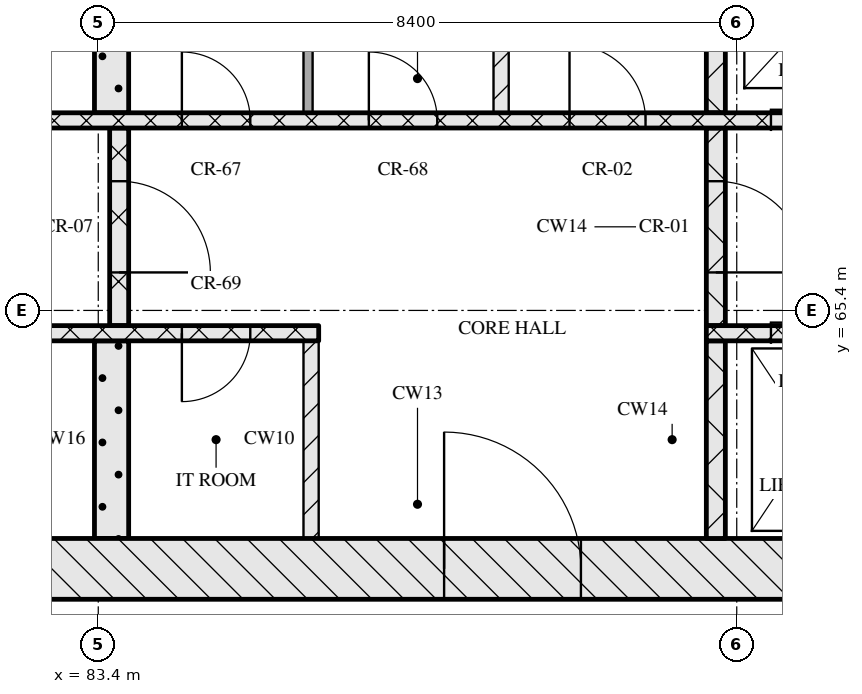
"""IFC4 building model, lengths in metres.
Left out: names, types, materials, properties, quantities, classifications, styles, units other than length and angle.
Written with IfcOpenShell. Run it as: python <this file> out.ifc"""

import sys

from ifc_helpers import new_model, si_unit, direction, frame, frame_2d, origin, place, context, subcontext, project, spatial, rectangle, extrude, element, fill, save


model = new_model("IFC4")
c1 = context("Model", 3, precision=1e-05, world=origin(), true_north=direction((0.0, 1.0)))
c2 = subcontext(c1, "Body", "Model", "MODEL_VIEW")
j1 = project(units=[si_unit("LENGTHUNIT", "METRE"), si_unit("PLANEANGLEUNIT", "RADIAN")], contexts=[c1])
p1 = place(None, origin())
s1 = spatial("IfcSite", under=j1, at=p1, CompositionType="ELEMENT")
p2 = place(p1, origin())
s2 = spatial("IfcBuilding", under=s1, at=p2, CompositionType="ELEMENT")
p3 = place(p2, frame((0.0, 0.0, 154.65)))
s3 = spatial("IfcBuildingStorey", under=s2, at=p3, CompositionType="ELEMENT", Elevation=154.65)
p4 = place(p3, frame((67.0, 62.0, 0.0), z_axis=(0.0, 0.0, 1.0), x_axis=(1.0, 0.0, 0.0)))
e1 = element("IfcWall", 1, at=p4, inside=s3, PredefinedType="SOLIDWALL", context=c2, shape_type="SweptSolid", body=[
    extrude(rectangle(XDim=41.2, YDim=0.8, at=frame_2d((20.6, 0.0))), origin(), (0.0, 0.0, 1.0), 3.32),
])
p5 = place(p4, frame((20.95, 0.0, 0.0)))
e2 = element("IfcOpeningElement", 2, at=p5, cuts=e1, PredefinedType="OPENING", context=c2, shape_type="SweptSolid", body=[
    extrude(rectangle(XDim=1.8, YDim=2.1, at=frame_2d((0.9, 1.05))), frame((0.0, 0.41, 0.0), z_axis=(0.0, -1.0, 0.0), x_axis=(1.0, 0.0, 0.0)), (0.0, 0.0, 1.0), 0.82),
])
p6 = place(p3, frame((83.575, 62.4, 0.0), z_axis=(0.0, 0.0, 1.0), x_axis=(0.0, 1.0, 0.0)))
e3 = element("IfcWall", 3, at=p6, inside=s3, PredefinedType="SOLIDWALL", context=c2, shape_type="SweptSolid", body=[
    extrude(rectangle(XDim=2.6, YDim=0.45, at=frame_2d((1.3, 0.0))), origin(), (0.0, 0.0, 1.0), 3.32),
])
p7 = place(p3, frame((86.2, 62.4, 0.0), z_axis=(0.0, 0.0, 1.0), x_axis=(0.0, 1.0, 0.0)))
e4 = element("IfcWall", 4, at=p7, inside=s3, PredefinedType="PARTITIONING", context=c2, shape_type="SweptSolid", body=[
    extrude(rectangle(XDim=2.6, YDim=0.2, at=frame_2d((1.3, 0.0))), origin(), (0.0, 0.0, 1.0), 3.32),
])
p8 = place(p3, frame((91.525, 62.4, 0.0), z_axis=(0.0, 0.0, 1.0), x_axis=(0.0, 1.0, 0.0)))
e5 = element("IfcWall", 5, at=p8, inside=s3, PredefinedType="SOLIDWALL", context=c2, shape_type="SweptSolid", body=[
    extrude(rectangle(XDim=2.6, YDim=0.25, at=frame_2d((1.3, 0.0))), origin(), (0.0, 0.0, 1.0), 3.32),
])
p9 = place(p3, frame((67.8, 65.1, 0.0), z_axis=(0.0, 0.0, 1.0), x_axis=(1.0, 0.0, 0.0)))
e6 = element("IfcWall", 6, at=p9, inside=s3, PredefinedType="SOLIDWALL", context=c2, shape_type="SweptSolid", body=[
    extrude(rectangle(XDim=18.5, YDim=0.2, at=frame_2d((9.25, 0.0))), origin(), (0.0, 0.0, 1.0), 3.32),
])
p10 = place(p9, frame((7.27, 0.0, 0.0)))
e7 = element("IfcOpeningElement", 7, at=p10, cuts=e6, PredefinedType="OPENING", context=c2, shape_type="SweptSolid", body=[
    extrude(rectangle(XDim=0.9, YDim=2.1, at=frame_2d((0.45, 1.05))), frame((0.0, 0.11, 0.0), z_axis=(0.0, -1.0, 0.0), x_axis=(1.0, 0.0, 0.0)), (0.0, 0.0, 1.0), 0.22),
])
p11 = place(p9, frame((11.45, 0.0, 0.0)))
e8 = element("IfcOpeningElement", 8, at=p11, cuts=e6, PredefinedType="OPENING", context=c2, shape_type="SweptSolid", body=[
    extrude(rectangle(XDim=0.9, YDim=2.1, at=frame_2d((0.45, 1.05))), frame((0.0, 0.11, 0.0), z_axis=(0.0, -1.0, 0.0), x_axis=(1.0, 0.0, 0.0)), (0.0, 0.0, 1.0), 0.22),
])
p12 = place(p9, frame((16.7, 0.0, 0.0)))
e9 = element("IfcOpeningElement", 9, at=p12, cuts=e6, PredefinedType="OPENING", context=c2, shape_type="SweptSolid", body=[
    extrude(rectangle(XDim=0.9, YDim=2.1, at=frame_2d((0.45, 1.05))), frame((0.0, 0.11, 0.0), z_axis=(0.0, -1.0, 0.0), x_axis=(1.0, 0.0, 0.0)), (0.0, 0.0, 1.0), 0.22),
])
p13 = place(p3, frame((91.4, 65.1, 0.0), z_axis=(0.0, 0.0, 1.0), x_axis=(1.0, 0.0, 0.0)))
e10 = element("IfcWall", 10, at=p13, inside=s3, PredefinedType="SOLIDWALL", context=c2, shape_type="SweptSolid", body=[
    extrude(rectangle(XDim=16.0, YDim=0.2, at=frame_2d((8.0, 0.0))), origin(), (0.0, 0.0, 1.0), 3.32),
])
p14 = place(p13, frame((0.85, 0.0, 0.0)))
e11 = element("IfcOpeningElement", 11, at=p14, cuts=e10, PredefinedType="OPENING", context=c2, shape_type="SweptSolid", body=[
    extrude(rectangle(XDim=1.1, YDim=2.1, at=frame_2d((0.55, 1.05))), frame((0.0, 0.11, 0.0), z_axis=(0.0, -1.0, 0.0), x_axis=(1.0, 0.0, 0.0)), (0.0, 0.0, 1.0), 0.22),
])
p15 = place(p13, frame((3.35, 0.0, 0.0)))
e12 = element("IfcOpeningElement", 12, at=p15, cuts=e10, PredefinedType="OPENING", context=c2, shape_type="SweptSolid", body=[
    extrude(rectangle(XDim=1.1, YDim=2.1, at=frame_2d((0.55, 1.05))), frame((0.0, 0.11, 0.0), z_axis=(0.0, -1.0, 0.0), x_axis=(1.0, 0.0, 0.0)), (0.0, 0.0, 1.0), 0.22),
])
p16 = place(p13, frame((5.85, 0.0, 0.0)))
e13 = element("IfcOpeningElement", 13, at=p16, cuts=e10, PredefinedType="OPENING", context=c2, shape_type="SweptSolid", body=[
    extrude(rectangle(XDim=1.1, YDim=2.1, at=frame_2d((0.55, 1.05))), frame((0.0, 0.11, 0.0), z_axis=(0.0, -1.0, 0.0), x_axis=(1.0, 0.0, 0.0)), (0.0, 0.0, 1.0), 0.22),
])
p17 = place(p13, frame((7.83, 0.0, 0.0)))
e14 = element("IfcOpeningElement", 14, at=p17, cuts=e10, PredefinedType="OPENING", context=c2, shape_type="SweptSolid", body=[
    extrude(rectangle(XDim=0.9, YDim=2.1, at=frame_2d((0.45, 1.05))), frame((0.0, 0.11, 0.0), z_axis=(0.0, -1.0, 0.0), x_axis=(1.0, 0.0, 0.0)), (0.0, 0.0, 1.0), 0.22),
])
p18 = place(p3, frame((83.675, 65.2, 0.0), z_axis=(0.0, 0.0, 1.0), x_axis=(0.0, 1.0, 0.0)))
e15 = element("IfcWall", 15, at=p18, inside=s3, PredefinedType="SOLIDWALL", context=c2, shape_type="SweptSolid", body=[
    extrude(rectangle(XDim=2.6, YDim=0.25, at=frame_2d((1.3, 0.0))), origin(), (0.0, 0.0, 1.0), 3.32),
])
p19 = place(p18, frame((0.7, 0.0, 0.0)))
e16 = element("IfcOpeningElement", 16, at=p19, cuts=e15, PredefinedType="OPENING", context=c2, shape_type="SweptSolid", body=[
    extrude(rectangle(XDim=1.2, YDim=2.1, at=frame_2d((0.6, 1.05))), frame((0.0, 0.135, 0.0), z_axis=(0.0, -1.0, 0.0), x_axis=(1.0, 0.0, 0.0)), (0.0, 0.0, 1.0), 0.27),
])
p20 = place(p3, frame((91.525, 65.2, 0.0), z_axis=(0.0, 0.0, 1.0), x_axis=(0.0, 1.0, 0.0)))
e17 = element("IfcWall", 17, at=p20, inside=s3, PredefinedType="SOLIDWALL", context=c2, shape_type="SweptSolid", body=[
    extrude(rectangle(XDim=2.6, YDim=0.25, at=frame_2d((1.3, 0.0))), origin(), (0.0, 0.0, 1.0), 3.32),
])
p21 = place(p20, frame((0.7, 0.0, 0.0)))
e18 = element("IfcOpeningElement", 18, at=p21, cuts=e17, PredefinedType="OPENING", context=c2, shape_type="SweptSolid", body=[
    extrude(rectangle(XDim=1.2, YDim=2.1, at=frame_2d((0.6, 1.05))), frame((0.0, 0.135, 0.0), z_axis=(0.0, -1.0, 0.0), x_axis=(1.0, 0.0, 0.0)), (0.0, 0.0, 1.0), 0.27),
])
p22 = place(p3, frame((76.05, 67.9, 0.0), z_axis=(0.0, 0.0, 1.0), x_axis=(1.0, 0.0, 0.0)))
e19 = element("IfcWall", 19, at=p22, inside=s3, PredefinedType="SOLIDWALL", context=c2, shape_type="SweptSolid", body=[
    extrude(rectangle(XDim=23.1, YDim=0.2, at=frame_2d((11.55, 0.0))), origin(), (0.0, 0.0, 1.0), 3.32),
])
p23 = place(p22, frame((1.4, 0.0, 0.0)))
e20 = element("IfcOpeningElement", 20, at=p23, cuts=e19, PredefinedType="OPENING", context=c2, shape_type="SweptSolid", body=[
    extrude(rectangle(XDim=0.9, YDim=2.1, at=frame_2d((0.45, 1.05))), frame((0.0, 0.11, 0.0), z_axis=(0.0, -1.0, 0.0), x_axis=(1.0, 0.0, 0.0)), (0.0, 0.0, 1.0), 0.22),
])
p24 = place(p22, frame((5.11, 0.0, 0.0)))
e21 = element("IfcOpeningElement", 21, at=p24, cuts=e19, PredefinedType="OPENING", context=c2, shape_type="SweptSolid", body=[
    extrude(rectangle(XDim=0.9, YDim=2.1, at=frame_2d((0.45, 1.05))), frame((0.0, 0.11, 0.0), z_axis=(0.0, -1.0, 0.0), x_axis=(1.0, 0.0, 0.0)), (0.0, 0.0, 1.0), 0.22),
])
p25 = place(p22, frame((8.45, 0.0, 0.0)))
e22 = element("IfcOpeningElement", 22, at=p25, cuts=e19, PredefinedType="OPENING", context=c2, shape_type="SweptSolid", body=[
    extrude(rectangle(XDim=0.9, YDim=2.1, at=frame_2d((0.45, 1.05))), frame((0.0, 0.11, 0.0), z_axis=(0.0, -1.0, 0.0), x_axis=(1.0, 0.0, 0.0)), (0.0, 0.0, 1.0), 0.22),
])
p26 = place(p22, frame((10.91, 0.0, 0.0)))
e23 = element("IfcOpeningElement", 23, at=p26, cuts=e19, PredefinedType="OPENING", context=c2, shape_type="SweptSolid", body=[
    extrude(rectangle(XDim=0.9, YDim=2.1, at=frame_2d((0.45, 1.05))), frame((0.0, 0.11, 0.0), z_axis=(0.0, -1.0, 0.0), x_axis=(1.0, 0.0, 0.0)), (0.0, 0.0, 1.0), 0.22),
])
p27 = place(p22, frame((13.55, 0.0, 0.0)))
e24 = element("IfcOpeningElement", 24, at=p27, cuts=e19, PredefinedType="OPENING", context=c2, shape_type="SweptSolid", body=[
    extrude(rectangle(XDim=1.0, YDim=2.1, at=frame_2d((0.5, 1.05))), frame((0.0, 0.11, 0.0), z_axis=(0.0, -1.0, 0.0), x_axis=(1.0, 0.0, 0.0)), (0.0, 0.0, 1.0), 0.22),
])
p28 = place(p22, frame((16.2, 0.0, 0.0)))
e25 = element("IfcOpeningElement", 25, at=p28, cuts=e19, PredefinedType="OPENING", context=c2, shape_type="SweptSolid", body=[
    extrude(rectangle(XDim=1.1, YDim=2.1, at=frame_2d((0.55, 1.05))), frame((0.0, 0.11, 0.0), z_axis=(0.0, -1.0, 0.0), x_axis=(1.0, 0.0, 0.0)), (0.0, 0.0, 1.0), 0.22),
])
p29 = place(p22, frame((18.7, 0.0, 0.0)))
e26 = element("IfcOpeningElement", 26, at=p29, cuts=e19, PredefinedType="OPENING", context=c2, shape_type="SweptSolid", body=[
    extrude(rectangle(XDim=1.1, YDim=2.1, at=frame_2d((0.55, 1.05))), frame((0.0, 0.11, 0.0), z_axis=(0.0, -1.0, 0.0), x_axis=(1.0, 0.0, 0.0)), (0.0, 0.0, 1.0), 0.22),
])
p30 = place(p22, frame((21.2, 0.0, 0.0)))
e27 = element("IfcOpeningElement", 27, at=p30, cuts=e19, PredefinedType="OPENING", context=c2, shape_type="SweptSolid", body=[
    extrude(rectangle(XDim=1.1, YDim=2.1, at=frame_2d((0.55, 1.05))), frame((0.0, 0.11, 0.0), z_axis=(0.0, -1.0, 0.0), x_axis=(1.0, 0.0, 0.0)), (0.0, 0.0, 1.0), 0.22),
])
p31 = place(p3, frame((83.575, 68.0, 0.0), z_axis=(0.0, 0.0, 1.0), x_axis=(0.0, 1.0, 0.0)))
e28 = element("IfcWall", 28, at=p31, inside=s3, PredefinedType="SOLIDWALL", context=c2, shape_type="SweptSolid", body=[
    extrude(rectangle(XDim=2.6, YDim=0.45, at=frame_2d((1.3, 0.0))), origin(), (0.0, 0.0, 1.0), 3.32),
])
p32 = place(p3, frame((86.16, 68.0, 0.0), z_axis=(0.0, 0.0, 1.0), x_axis=(0.0, 1.0, 0.0)))
e29 = element("IfcWall", 29, at=p32, inside=s3, PredefinedType="PARTITIONING", context=c2, shape_type="SweptSolid", body=[
    extrude(rectangle(XDim=2.6, YDim=0.12, at=frame_2d((1.3, 0.0))), origin(), (0.0, 0.0, 1.0), 3.32),
])
p33 = place(p3, frame((88.7, 68.0, 0.0), z_axis=(0.0, 0.0, 1.0), x_axis=(0.0, 1.0, 0.0)))
e30 = element("IfcWall", 30, at=p33, inside=s3, PredefinedType="PARTITIONING", context=c2, shape_type="SweptSolid", body=[
    extrude(rectangle(XDim=2.6, YDim=0.2, at=frame_2d((1.3, 0.0))), origin(), (0.0, 0.0, 1.0), 3.32),
])
p34 = place(p3, frame((91.525, 68.0, 0.0), z_axis=(0.0, 0.0, 1.0), x_axis=(0.0, 1.0, 0.0)))
e31 = element("IfcWall", 31, at=p34, inside=s3, PredefinedType="SOLIDWALL", context=c2, shape_type="SweptSolid", body=[
    extrude(rectangle(XDim=2.6, YDim=0.25, at=frame_2d((1.3, 0.0))), origin(), (0.0, 0.0, 1.0), 3.32),
])
p35 = place(p5, origin())
e32 = element("IfcDoor", 32, at=p35, inside=s3, OperationType="DOUBLE_DOOR_SINGLE_SWING", PredefinedType="DOOR", context=c2, shape_type="SweptSolid", body=[
    extrude(rectangle(XDim=1.8, YDim=2.1, at=frame_2d((0.9, 1.05))), frame((0.0, 0.025, 0.0), z_axis=(0.0, -1.0, 0.0), x_axis=(1.0, 0.0, 0.0)), (0.0, 0.0, 1.0), 0.05),
])
fill(e2, e32)
p36 = place(p12, origin())
e33 = element("IfcDoor", 33, at=p36, inside=s3, OperationType="SINGLE_SWING_RIGHT", PredefinedType="DOOR", context=c2, shape_type="SweptSolid", body=[
    extrude(rectangle(XDim=0.9, YDim=2.1, at=frame_2d((0.45, 1.05))), frame((0.0, 0.025, 0.0), z_axis=(0.0, -1.0, 0.0), x_axis=(1.0, 0.0, 0.0)), (0.0, 0.0, 1.0), 0.05),
])
fill(e9, e33)
p37 = place(p14, origin())
e34 = element("IfcDoor", 34, at=p37, inside=s3, OperationType="SLIDING_TO_LEFT", PredefinedType="DOOR", context=c2, shape_type="SweptSolid", body=[
    extrude(rectangle(XDim=1.1, YDim=2.1, at=frame_2d((0.55, 1.05))), frame((0.0, 0.025, 0.0), z_axis=(0.0, -1.0, 0.0), x_axis=(1.0, 0.0, 0.0)), (0.0, 0.0, 1.0), 0.05),
])
fill(e11, e34)
p38 = place(p19, origin())
e35 = element("IfcDoor", 35, at=p38, inside=s3, OperationType="SINGLE_SWING_RIGHT", PredefinedType="DOOR", context=c2, shape_type="SweptSolid", body=[
    extrude(rectangle(XDim=1.2, YDim=2.1, at=frame_2d((0.6, 1.05))), frame((0.0, 0.025, 0.0), z_axis=(0.0, -1.0, 0.0), x_axis=(1.0, 0.0, 0.0)), (0.0, 0.0, 1.0), 0.05),
])
fill(e16, e35)
p39 = place(p21, origin())
e36 = element("IfcDoor", 36, at=p39, inside=s3, OperationType="SINGLE_SWING_RIGHT", PredefinedType="DOOR", context=c2, shape_type="SweptSolid", body=[
    extrude(rectangle(XDim=1.2, YDim=2.1, at=frame_2d((0.6, 1.05))), frame((0.0, 0.025, 0.0), z_axis=(0.0, -1.0, 0.0), x_axis=(1.0, 0.0, 0.0)), (0.0, 0.0, 1.0), 0.05),
])
fill(e18, e36)
p40 = place(p25, origin())
e37 = element("IfcDoor", 37, at=p40, inside=s3, OperationType="SINGLE_SWING_LEFT", PredefinedType="DOOR", context=c2, shape_type="SweptSolid", body=[
    extrude(rectangle(XDim=0.9, YDim=2.1, at=frame_2d((0.45, 1.05))), frame((0.0, 0.025, 0.0), z_axis=(0.0, -1.0, 0.0), x_axis=(1.0, 0.0, 0.0)), (0.0, 0.0, 1.0), 0.05),
])
fill(e22, e37)
p41 = place(p26, origin())
e38 = element("IfcDoor", 38, at=p41, inside=s3, OperationType="SINGLE_SWING_LEFT", PredefinedType="DOOR", context=c2, shape_type="SweptSolid", body=[
    extrude(rectangle(XDim=0.9, YDim=2.1, at=frame_2d((0.45, 1.05))), frame((0.0, 0.025, 0.0), z_axis=(0.0, -1.0, 0.0), x_axis=(1.0, 0.0, 0.0)), (0.0, 0.0, 1.0), 0.05),
])
fill(e23, e38)
p42 = place(p27, origin())
e39 = element("IfcDoor", 39, at=p42, inside=s3, OperationType="SINGLE_SWING_LEFT", PredefinedType="DOOR", context=c2, shape_type="SweptSolid", body=[
    extrude(rectangle(XDim=1.0, YDim=2.1, at=frame_2d((0.5, 1.05))), frame((0.0, 0.025, 0.0), z_axis=(0.0, -1.0, 0.0), x_axis=(1.0, 0.0, 0.0)), (0.0, 0.0, 1.0), 0.05),
])
fill(e24, e39)
p43 = place(p28, origin())
e40 = element("IfcDoor", 40, at=p43, inside=s3, OperationType="SLIDING_TO_RIGHT", PredefinedType="DOOR", context=c2, shape_type="SweptSolid", body=[
    extrude(rectangle(XDim=1.1, YDim=2.1, at=frame_2d((0.55, 1.05))), frame((0.0, 0.025, 0.0), z_axis=(0.0, -1.0, 0.0), x_axis=(1.0, 0.0, 0.0)), (0.0, 0.0, 1.0), 0.05),
])
fill(e25, e40)
save(model, sys.argv[1])
